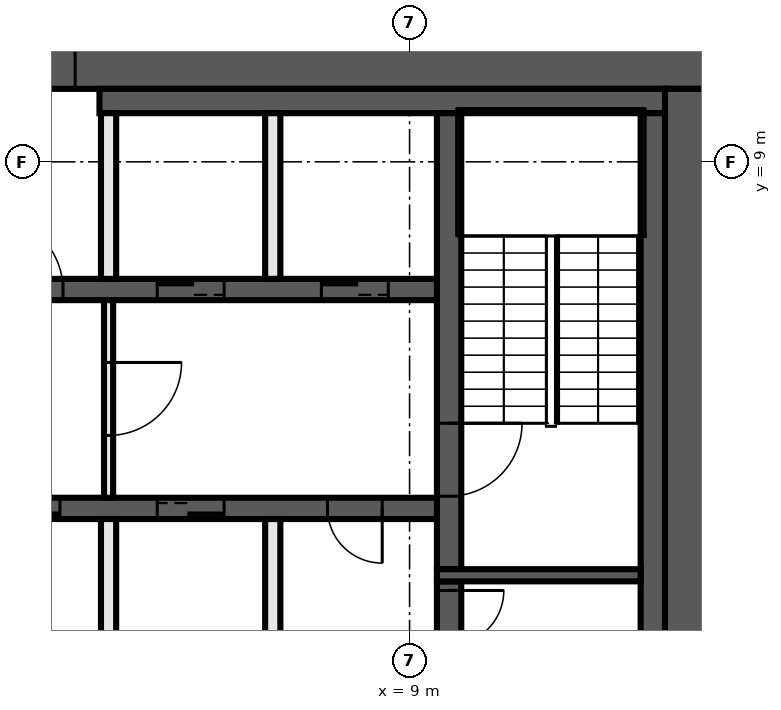
"""IFC4 building model, lengths in metres.
Left out: names, types, materials, properties, quantities, classifications, styles, units other than length and angle.
Written with IfcOpenShell. Run it as: python <this file> out.ifc"""

import sys

from ifc_helpers import new_model, si_unit, direction, frame, frame_2d, origin, place, context, subcontext, project, spatial, rectangle, extrude, element, fill, save


model = new_model("IFC4")
c1 = context("Model", 3, precision=1e-05, world=origin(), true_north=direction((0.0, 1.0)))
c2 = subcontext(c1, "Body", "Model", "MODEL_VIEW")
j1 = project(units=[si_unit("LENGTHUNIT", "METRE"), si_unit("PLANEANGLEUNIT", "RADIAN")], contexts=[c1])
p1 = place(None, origin())
s1 = spatial("IfcSite", under=j1, at=p1, CompositionType="ELEMENT")
p2 = place(p1, origin())
s2 = spatial("IfcBuilding", under=s1, at=p2, CompositionType="ELEMENT")
p3 = place(p2, frame((0.0, 0.0, 179.6)))
s3 = spatial("IfcBuildingStorey", under=s2, at=p3, CompositionType="ELEMENT", Elevation=179.6)
p4 = place(p3, frame((-14.0, 10.6, 0.0), z_axis=(0.0, 0.0, 1.0), x_axis=(1.0, 0.0, 0.0)))
e1 = element("IfcWall", 1, at=p4, inside=s3, PredefinedType="SHEAR", context=c2, shape_type="SweptSolid", body=[
    extrude(rectangle(XDim=28.0, YDim=0.8, at=frame_2d((14.0, 0.0))), origin(), (0.0, 0.0, 1.0), 3.7),
])
p5 = place(p4, frame((15.9, 0.0, 0.0)))
e2 = element("IfcOpeningElement", 2, at=p5, cuts=e1, PredefinedType="OPENING", context=c2, shape_type="SweptSolid", body=[
    extrude(rectangle(XDim=1.6, YDim=2.1, at=frame_2d((0.8, 1.05))), frame((0.0, 0.41, 0.0), z_axis=(0.0, -1.0, 0.0), x_axis=(1.0, 0.0, 0.0)), (0.0, 0.0, 1.0), 0.82),
])
p6 = place(p3, frame((13.6, 10.2, 0.0), z_axis=(0.0, 0.0, 1.0), x_axis=(0.0, -1.0, 0.0)))
e3 = element("IfcWall", 3, at=p6, inside=s3, PredefinedType="SHEAR", context=c2, shape_type="SweptSolid", body=[
    extrude(rectangle(XDim=20.4, YDim=0.8, at=frame_2d((10.2, 0.0))), origin(), (0.0, 0.0, 1.0), 3.7),
])
p7 = place(p3, frame((3.9, 10.0, 0.0), z_axis=(0.0, 0.0, 1.0), x_axis=(1.0, 0.0, 0.0)))
e4 = element("IfcWall", 4, at=p7, inside=s3, PredefinedType="SHEAR", context=c2, shape_type="SweptSolid", body=[
    extrude(rectangle(XDim=9.3, YDim=0.4, at=frame_2d((4.65, 0.0))), origin(), (0.0, 0.0, 1.0), 3.7),
])
p8 = place(p3, frame((13.0, 9.8, 0.0), z_axis=(0.0, 0.0, 1.0), x_axis=(0.0, -1.0, 0.0)))
e5 = element("IfcWall", 5, at=p8, inside=s3, PredefinedType="SHEAR", context=c2, shape_type="SweptSolid", body=[
    extrude(rectangle(XDim=19.6, YDim=0.4, at=frame_2d((9.8, 0.0))), origin(), (0.0, 0.0, 1.0), 3.7),
])
p9 = place(p3, frame((9.65, 2.1, 0.0), z_axis=(0.0, 0.0, 1.0), x_axis=(0.0, -1.0, 0.0)))
e6 = element("IfcWall", 6, at=p9, inside=s3, PredefinedType="SHEAR", context=c2, shape_type="SweptSolid", body=[
    extrude(rectangle(XDim=4.2, YDim=0.4, at=frame_2d((2.1, 0.0))), origin(), (0.0, 0.0, 1.0), 3.7),
])
p10 = place(p9, frame((0.15, 0.0, 0.0)))
e7 = element("IfcOpeningElement", 7, at=p10, cuts=e6, PredefinedType="OPENING", context=c2, shape_type="SweptSolid", body=[
    extrude(rectangle(XDim=0.9, YDim=2.1, at=frame_2d((0.45, 1.05))), frame((0.0, 0.21, 0.0), z_axis=(0.0, -1.0, 0.0), x_axis=(1.0, 0.0, 0.0)), (0.0, 0.0, 1.0), 0.42),
])
p11 = place(p3, frame((9.65, 9.8, 0.0), z_axis=(0.0, 0.0, 1.0), x_axis=(0.0, -1.0, 0.0)))
e8 = element("IfcWall", 8, at=p11, inside=s3, PredefinedType="SHEAR", context=c2, shape_type="SweptSolid", body=[
    extrude(rectangle(XDim=7.5, YDim=0.4, at=frame_2d((3.75, 0.0))), origin(), (0.0, 0.0, 1.0), 3.7),
])
p12 = place(p11, frame((5.1, 0.0, 0.0)))
e9 = element("IfcOpeningElement", 9, at=p12, cuts=e8, PredefinedType="OPENING", context=c2, shape_type="SweptSolid", body=[
    extrude(rectangle(XDim=1.2, YDim=2.1, at=frame_2d((0.6, 1.05))), frame((0.0, 0.21, 0.0), z_axis=(0.0, -1.0, 0.0), x_axis=(1.0, 0.0, 0.0)), (0.0, 0.0, 1.0), 0.42),
])
p13 = place(p3, frame((9.45, 2.2, 0.0), z_axis=(0.0, 0.0, 1.0), x_axis=(1.0, 0.0, 0.0)))
e10 = element("IfcWall", 10, at=p13, inside=s3, PredefinedType="SHEAR", context=c2, shape_type="SweptSolid", body=[
    extrude(rectangle(XDim=3.35, YDim=0.2, at=frame_2d((1.675, 0.0))), origin(), (0.0, 0.0, 1.0), 3.7),
])
p14 = place(p3, frame((-9.45, 6.9, 0.0), z_axis=(0.0, 0.0, 1.0), x_axis=(1.0, 0.0, 0.0)))
e11 = element("IfcWall", 11, at=p14, inside=s3, PredefinedType="SHEAR", context=c2, shape_type="SweptSolid", body=[
    extrude(rectangle(XDim=18.9, YDim=0.35, at=frame_2d((9.45, 0.0))), origin(), (0.0, 0.0, 1.0), 3.7),
])
p15 = place(p14, frame((11.55, 0.0, 0.0)))
e12 = element("IfcOpeningElement", 12, at=p15, cuts=e11, PredefinedType="OPENING", context=c2, shape_type="SweptSolid", body=[
    extrude(rectangle(XDim=1.2, YDim=2.1, at=frame_2d((0.6, 1.05))), frame((0.0, 0.185, 0.0), z_axis=(0.0, -1.0, 0.0), x_axis=(1.0, 0.0, 0.0)), (0.0, 0.0, 1.0), 0.37),
])
p16 = place(p14, frame((14.3, 0.0, 0.0)))
e13 = element("IfcOpeningElement", 13, at=p16, cuts=e11, PredefinedType="OPENING", context=c2, shape_type="SweptSolid", body=[
    extrude(rectangle(XDim=1.1, YDim=2.1, at=frame_2d((0.55, 1.05))), frame((0.0, 0.185, 0.0), z_axis=(0.0, -1.0, 0.0), x_axis=(1.0, 0.0, 0.0)), (0.0, 0.0, 1.0), 0.37),
])
p17 = place(p14, frame((17.0, 0.0, 0.0)))
e14 = element("IfcOpeningElement", 14, at=p17, cuts=e11, PredefinedType="OPENING", context=c2, shape_type="SweptSolid", body=[
    extrude(rectangle(XDim=1.1, YDim=2.1, at=frame_2d((0.55, 1.05))), frame((0.0, 0.185, 0.0), z_axis=(0.0, -1.0, 0.0), x_axis=(1.0, 0.0, 0.0)), (0.0, 0.0, 1.0), 0.37),
])
p18 = place(p14, frame((3.6, 0.0, 0.0)))
e15 = element("IfcOpeningElement", 15, at=p18, cuts=e11, PredefinedType="OPENING", context=c2, shape_type="SweptSolid", body=[
    extrude(rectangle(XDim=0.9, YDim=2.1, at=frame_2d((0.45, 1.05))), frame((0.0, 0.185, 0.0), z_axis=(0.0, -1.0, 0.0), x_axis=(1.0, 0.0, 0.0)), (0.0, 0.0, 1.0), 0.37),
])
p19 = place(p14, frame((9.0, 0.0, 0.0)))
e16 = element("IfcOpeningElement", 16, at=p19, cuts=e11, PredefinedType="OPENING", context=c2, shape_type="SweptSolid", body=[
    extrude(rectangle(XDim=0.9, YDim=2.1, at=frame_2d((0.45, 1.05))), frame((0.0, 0.185, 0.0), z_axis=(0.0, -1.0, 0.0), x_axis=(1.0, 0.0, 0.0)), (0.0, 0.0, 1.0), 0.37),
])
p20 = place(p3, frame((9.45, 3.3, 0.0), z_axis=(0.0, 0.0, 1.0), x_axis=(-1.0, 0.0, 0.0)))
e17 = element("IfcWall", 17, at=p20, inside=s3, PredefinedType="SHEAR", context=c2, shape_type="SweptSolid", body=[
    extrude(rectangle(XDim=18.9, YDim=0.35, at=frame_2d((9.45, 0.0))), origin(), (0.0, 0.0, 1.0), 3.7),
])
p21 = place(p20, frame((6.2, 0.0, 0.0)))
e18 = element("IfcOpeningElement", 18, at=p21, cuts=e17, PredefinedType="OPENING", context=c2, shape_type="SweptSolid", body=[
    extrude(rectangle(XDim=1.1, YDim=2.1, at=frame_2d((0.55, 1.05))), frame((0.0, 0.185, 0.0), z_axis=(0.0, -1.0, 0.0), x_axis=(1.0, 0.0, 0.0)), (0.0, 0.0, 1.0), 0.37),
])
p22 = place(p20, frame((3.5, 0.0, 0.0)))
e19 = element("IfcOpeningElement", 19, at=p22, cuts=e17, PredefinedType="OPENING", context=c2, shape_type="SweptSolid", body=[
    extrude(rectangle(XDim=1.1, YDim=2.1, at=frame_2d((0.55, 1.05))), frame((0.0, 0.185, 0.0), z_axis=(0.0, -1.0, 0.0), x_axis=(1.0, 0.0, 0.0)), (0.0, 0.0, 1.0), 0.37),
])
p23 = place(p20, frame((0.9, 0.0, 0.0)))
e20 = element("IfcOpeningElement", 20, at=p23, cuts=e17, PredefinedType="OPENING", context=c2, shape_type="SweptSolid", body=[
    extrude(rectangle(XDim=0.9, YDim=2.1, at=frame_2d((0.45, 1.05))), frame((0.0, 0.185, 0.0), z_axis=(0.0, -1.0, 0.0), x_axis=(1.0, 0.0, 0.0)), (0.0, 0.0, 1.0), 0.37),
])
p24 = place(p20, frame((14.4, 0.0, 0.0)))
e21 = element("IfcOpeningElement", 21, at=p24, cuts=e17, PredefinedType="OPENING", context=c2, shape_type="SweptSolid", body=[
    extrude(rectangle(XDim=0.9, YDim=2.1, at=frame_2d((0.45, 1.05))), frame((0.0, 0.185, 0.0), z_axis=(0.0, -1.0, 0.0), x_axis=(1.0, 0.0, 0.0)), (0.0, 0.0, 1.0), 0.37),
])
p25 = place(p20, frame((9.0, 0.0, 0.0)))
e22 = element("IfcOpeningElement", 22, at=p25, cuts=e17, PredefinedType="OPENING", context=c2, shape_type="SweptSolid", body=[
    extrude(rectangle(XDim=0.9, YDim=2.1, at=frame_2d((0.45, 1.05))), frame((0.0, 0.185, 0.0), z_axis=(0.0, -1.0, 0.0), x_axis=(1.0, 0.0, 0.0)), (0.0, 0.0, 1.0), 0.37),
])
for number, where, z_axis, x_axis in (
    (23, (6.75, 0.4, 0.0), (0.0, 0.0, 1.0), (0.0, 1.0, 0.0)),
    (24, (6.75, 7.075, 0.0), (0.0, 0.0, 1.0), (0.0, 1.0, 0.0)),
):
    element("IfcWall", number, at=place(p3, frame(where, z_axis=z_axis, x_axis=x_axis)), inside=s3, PredefinedType="SOLIDWALL", context=c2, shape_type="SweptSolid", body=[
        extrude(rectangle(XDim=2.725, YDim=0.25, at=frame_2d((1.363, 0.0))), origin(), (0.0, 0.0, 1.0), 3.7),
    ])
p26 = place(p3, frame((4.05, 6.725, 0.0), z_axis=(0.0, 0.0, 1.0), x_axis=(0.0, -1.0, 0.0)))
e25 = element("IfcWall", 25, at=p26, inside=s3, PredefinedType="PARTITIONING", context=c2, shape_type="SweptSolid", body=[
    extrude(rectangle(XDim=3.25, YDim=0.15, at=frame_2d((1.625, 0.0))), origin(), (0.0, 0.0, 1.0), 3.7),
])
p27 = place(p26, frame((1.025, 0.0, 0.0)))
e26 = element("IfcOpeningElement", 26, at=p27, cuts=e25, PredefinedType="OPENING", context=c2, shape_type="SweptSolid", body=[
    extrude(rectangle(XDim=1.2, YDim=2.1, at=frame_2d((0.6, 1.05))), frame((0.0, 0.085, 0.0), z_axis=(0.0, -1.0, 0.0), x_axis=(1.0, 0.0, 0.0)), (0.0, 0.0, 1.0), 0.17),
])
for number, where, z_axis, x_axis in (
    (27, (4.05, 0.4, 0.0), (0.0, 0.0, 1.0), (0.0, 1.0, 0.0)),
    (28, (4.05, 7.075, 0.0), (0.0, 0.0, 1.0), (0.0, 1.0, 0.0)),
):
    element("IfcWall", number, at=place(p3, frame(where, z_axis=z_axis, x_axis=x_axis)), inside=s3, PredefinedType="SOLIDWALL", context=c2, shape_type="SweptSolid", body=[
        extrude(rectangle(XDim=2.725, YDim=0.25, at=frame_2d((1.363, 0.0))), origin(), (0.0, 0.0, 1.0), 3.7),
    ])
p28 = place(p10, origin())
e29 = element("IfcDoor", 29, at=p28, inside=s3, OperationType="SINGLE_SWING_RIGHT", PredefinedType="DOOR", context=c2, shape_type="SweptSolid", body=[
    extrude(rectangle(XDim=0.9, YDim=2.1, at=frame_2d((0.45, 1.05))), frame((0.0, 0.025, 0.0), z_axis=(0.0, -1.0, 0.0), x_axis=(1.0, 0.0, 0.0)), (0.0, 0.0, 1.0), 0.05),
])
fill(e7, e29)
p29 = place(p5, origin())
e30 = element("IfcDoor", 30, at=p29, inside=s3, OperationType="DOUBLE_DOOR_SINGLE_SWING", PredefinedType="DOOR", context=c2, shape_type="SweptSolid", body=[
    extrude(rectangle(XDim=1.6, YDim=2.1, at=frame_2d((0.8, 1.05))), frame((0.0, 0.025, 0.0), z_axis=(0.0, -1.0, 0.0), x_axis=(1.0, 0.0, 0.0)), (0.0, 0.0, 1.0), 0.05),
])
fill(e2, e30)
p30 = place(p15, origin())
e31 = element("IfcDoor", 31, at=p30, inside=s3, OperationType="SINGLE_SWING_LEFT", PredefinedType="DOOR", context=c2, shape_type="SweptSolid", body=[
    extrude(rectangle(XDim=1.2, YDim=2.1, at=frame_2d((0.6, 1.05))), frame((0.0, 0.025, 0.0), z_axis=(0.0, -1.0, 0.0), x_axis=(1.0, 0.0, 0.0)), (0.0, 0.0, 1.0), 0.05),
])
fill(e12, e31)
p31 = place(p16, origin())
e32 = element("IfcDoor", 32, at=p31, inside=s3, OperationType="DOUBLE_DOOR_SLIDING", PredefinedType="DOOR", context=c2, shape_type="SweptSolid", body=[
    extrude(rectangle(XDim=1.1, YDim=2.1, at=frame_2d((0.55, 1.05))), frame((0.0, 0.025, 0.0), z_axis=(0.0, -1.0, 0.0), x_axis=(1.0, 0.0, 0.0)), (0.0, 0.0, 1.0), 0.05),
])
fill(e13, e32)
p32 = place(p17, origin())
e33 = element("IfcDoor", 33, at=p32, inside=s3, OperationType="DOUBLE_DOOR_SLIDING", PredefinedType="DOOR", context=c2, shape_type="SweptSolid", body=[
    extrude(rectangle(XDim=1.1, YDim=2.1, at=frame_2d((0.55, 1.05))), frame((0.0, 0.025, 0.0), z_axis=(0.0, -1.0, 0.0), x_axis=(1.0, 0.0, 0.0)), (0.0, 0.0, 1.0), 0.05),
])
fill(e14, e33)
p33 = place(p21, origin())
e34 = element("IfcDoor", 34, at=p33, inside=s3, OperationType="DOUBLE_DOOR_SLIDING", PredefinedType="DOOR", context=c2, shape_type="SweptSolid", body=[
    extrude(rectangle(XDim=1.1, YDim=2.1, at=frame_2d((0.55, 1.05))), frame((0.0, 0.025, 0.0), z_axis=(0.0, -1.0, 0.0), x_axis=(1.0, 0.0, 0.0)), (0.0, 0.0, 1.0), 0.05),
])
fill(e18, e34)
p34 = place(p22, origin())
e35 = element("IfcDoor", 35, at=p34, inside=s3, OperationType="DOUBLE_DOOR_SLIDING", PredefinedType="DOOR", context=c2, shape_type="SweptSolid", body=[
    extrude(rectangle(XDim=1.1, YDim=2.1, at=frame_2d((0.55, 1.05))), frame((0.0, 0.025, 0.0), z_axis=(0.0, -1.0, 0.0), x_axis=(1.0, 0.0, 0.0)), (0.0, 0.0, 1.0), 0.05),
])
fill(e19, e35)
p35 = place(p23, origin())
e36 = element("IfcDoor", 36, at=p35, inside=s3, OperationType="SINGLE_SWING_LEFT", PredefinedType="DOOR", context=c2, shape_type="SweptSolid", body=[
    extrude(rectangle(XDim=0.9, YDim=2.1, at=frame_2d((0.45, 1.05))), frame((0.0, 0.025, 0.0), z_axis=(0.0, -1.0, 0.0), x_axis=(1.0, 0.0, 0.0)), (0.0, 0.0, 1.0), 0.05),
])
fill(e20, e36)
p36 = place(p12, origin())
e37 = element("IfcDoor", 37, at=p36, inside=s3, OperationType="SINGLE_SWING_LEFT", PredefinedType="DOOR", context=c2, shape_type="SweptSolid", body=[
    extrude(rectangle(XDim=1.2, YDim=2.1, at=frame_2d((0.6, 1.05))), frame((0.0, 0.025, 0.0), z_axis=(0.0, -1.0, 0.0), x_axis=(1.0, 0.0, 0.0)), (0.0, 0.0, 1.0), 0.05),
])
fill(e9, e37)
p37 = place(p27, origin())
e38 = element("IfcDoor", 38, at=p37, inside=s3, OperationType="SINGLE_SWING_RIGHT", PredefinedType="DOOR", context=c2, shape_type="SweptSolid", body=[
    extrude(rectangle(XDim=1.2, YDim=2.1, at=frame_2d((0.6, 1.05))), frame((0.0, 0.025, 0.0), z_axis=(0.0, -1.0, 0.0), x_axis=(1.0, 0.0, 0.0)), (0.0, 0.0, 1.0), 0.05),
])
fill(e26, e38)
save(model, sys.argv[1])
